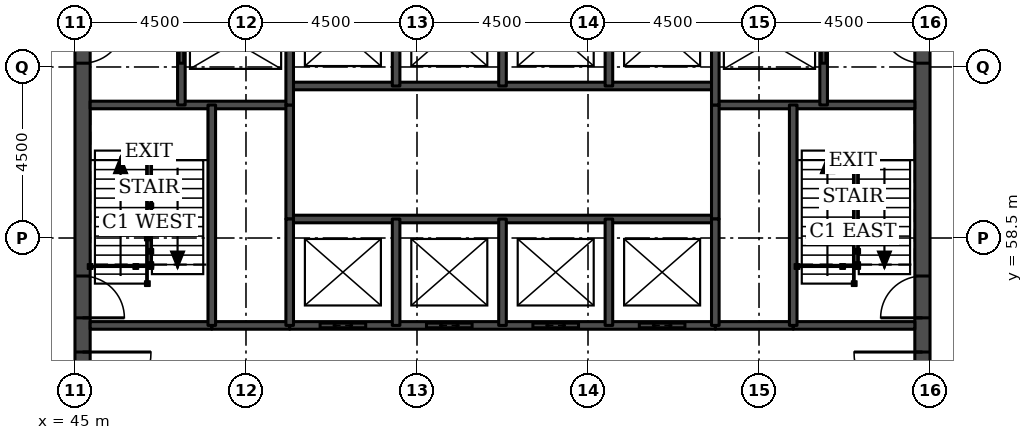
"""IFC4 building model, lengths in metres.
Left out: names, types, materials, properties, quantities, classifications, styles, units other than length and angle.
Written with IfcOpenShell. Run it as: python <this file> out.ifc"""

import sys

from ifc_helpers import new_model, si_unit, direction, frame, frame_2d, origin, place, context, subcontext, project, spatial, rectangle, extrude, element, fill, save


model = new_model("IFC4")
c1 = context("Model", 3, precision=1e-05, world=origin(), true_north=direction((0.0, 1.0)))
c2 = subcontext(c1, "Body", "Model", "MODEL_VIEW")
j1 = project(units=[si_unit("LENGTHUNIT", "METRE"), si_unit("PLANEANGLEUNIT", "RADIAN")], contexts=[c1])
p1 = place(None, origin())
s1 = spatial("IfcSite", under=j1, at=p1, CompositionType="ELEMENT")
p2 = place(p1, origin())
s2 = spatial("IfcBuilding", under=s1, at=p2, CompositionType="ELEMENT")
p3 = place(p2, frame((0.0, 0.0, 226.7)))
s3 = spatial("IfcBuildingStorey", under=s2, at=p3, CompositionType="ELEMENT", Elevation=226.7)
p4 = place(p3, frame((45.2, 49.5, 0.0), z_axis=(0.0, 0.0, 1.0), x_axis=(0.0, 1.0, 0.0)))
e1 = element("IfcWall", 1, at=p4, inside=s3, PredefinedType="SHEAR", context=c2, shape_type="SweptSolid", body=[
    extrude(rectangle(XDim=22.5, YDim=0.4, at=frame_2d((11.25, 0.0))), origin(), (0.0, 0.0, 1.0), 3.7),
])
p5 = place(p4, frame((4.2, 0.0, 0.0)))
e2 = element("IfcOpeningElement", 2, at=p5, cuts=e1, PredefinedType="OPENING", context=c2, shape_type="SweptSolid", body=[
    extrude(rectangle(XDim=1.8, YDim=2.1, at=frame_2d((0.9, 1.05))), frame((0.0, 0.21, 0.0), z_axis=(0.0, -1.0, 0.0), x_axis=(1.0, 0.0, 0.0)), (0.0, 0.0, 1.0), 0.42),
])
p6 = place(p4, frame((6.9, 0.0, 0.0)))
e3 = element("IfcOpeningElement", 3, at=p6, cuts=e1, PredefinedType="OPENING", context=c2, shape_type="SweptSolid", body=[
    extrude(rectangle(XDim=1.1, YDim=2.1, at=frame_2d((0.55, 1.05))), frame((0.0, 0.21, 0.0), z_axis=(0.0, -1.0, 0.0), x_axis=(1.0, 0.0, 0.0)), (0.0, 0.0, 1.0), 0.42),
])
p7 = place(p4, frame((13.6, 0.0, 0.0)))
e4 = element("IfcOpeningElement", 4, at=p7, cuts=e1, PredefinedType="OPENING", context=c2, shape_type="SweptSolid", body=[
    extrude(rectangle(XDim=1.1, YDim=2.1, at=frame_2d((0.55, 1.05))), frame((0.0, 0.21, 0.0), z_axis=(0.0, -1.0, 0.0), x_axis=(1.0, 0.0, 0.0)), (0.0, 0.0, 1.0), 0.42),
])
p8 = place(p4, frame((16.5, 0.0, 0.0)))
e5 = element("IfcOpeningElement", 5, at=p8, cuts=e1, PredefinedType="OPENING", context=c2, shape_type="SweptSolid", body=[
    extrude(rectangle(XDim=1.8, YDim=2.1, at=frame_2d((0.9, 1.05))), frame((0.0, 0.21, 0.0), z_axis=(0.0, -1.0, 0.0), x_axis=(1.0, 0.0, 0.0)), (0.0, 0.0, 1.0), 0.42),
])
p9 = place(p3, frame((67.3, 49.5, 0.0), z_axis=(0.0, 0.0, 1.0), x_axis=(0.0, 1.0, 0.0)))
e6 = element("IfcWall", 6, at=p9, inside=s3, PredefinedType="SHEAR", context=c2, shape_type="SweptSolid", body=[
    extrude(rectangle(XDim=22.5, YDim=0.4, at=frame_2d((11.25, 0.0))), origin(), (0.0, 0.0, 1.0), 3.7),
])
p10 = place(p9, frame((4.2, 0.0, 0.0)))
e7 = element("IfcOpeningElement", 7, at=p10, cuts=e6, PredefinedType="OPENING", context=c2, shape_type="SweptSolid", body=[
    extrude(rectangle(XDim=1.8, YDim=2.1, at=frame_2d((0.9, 1.05))), frame((0.0, 0.21, 0.0), z_axis=(0.0, -1.0, 0.0), x_axis=(1.0, 0.0, 0.0)), (0.0, 0.0, 1.0), 0.42),
])
p11 = place(p9, frame((6.9, 0.0, 0.0)))
e8 = element("IfcOpeningElement", 8, at=p11, cuts=e6, PredefinedType="OPENING", context=c2, shape_type="SweptSolid", body=[
    extrude(rectangle(XDim=1.1, YDim=2.1, at=frame_2d((0.55, 1.05))), frame((0.0, 0.21, 0.0), z_axis=(0.0, -1.0, 0.0), x_axis=(1.0, 0.0, 0.0)), (0.0, 0.0, 1.0), 0.42),
])
p12 = place(p9, frame((13.6, 0.0, 0.0)))
e9 = element("IfcOpeningElement", 9, at=p12, cuts=e6, PredefinedType="OPENING", context=c2, shape_type="SweptSolid", body=[
    extrude(rectangle(XDim=1.1, YDim=2.1, at=frame_2d((0.55, 1.05))), frame((0.0, 0.21, 0.0), z_axis=(0.0, -1.0, 0.0), x_axis=(1.0, 0.0, 0.0)), (0.0, 0.0, 1.0), 0.42),
])
p13 = place(p9, frame((16.5, 0.0, 0.0)))
e10 = element("IfcOpeningElement", 10, at=p13, cuts=e6, PredefinedType="OPENING", context=c2, shape_type="SweptSolid", body=[
    extrude(rectangle(XDim=1.8, YDim=2.1, at=frame_2d((0.9, 1.05))), frame((0.0, 0.21, 0.0), z_axis=(0.0, -1.0, 0.0), x_axis=(1.0, 0.0, 0.0)), (0.0, 0.0, 1.0), 0.42),
])
for number, where, z_axis, x_axis in (
    (11, (48.6, 56.2, 0.0), (0.0, 0.0, 1.0), (1.0, 0.0, 0.0)),
    (12, (61.85, 56.2, 0.0), (0.0, 0.0, 1.0), (1.0, 0.0, 0.0)),
):
    element("IfcWall", number, at=place(p3, frame(where, z_axis=z_axis, x_axis=x_axis)), inside=s3, PredefinedType="SOLIDWALL", context=c2, shape_type="SweptSolid", body=[
        extrude(rectangle(XDim=2.05, YDim=0.2, at=frame_2d((1.025, 0.0))), origin(), (0.0, 0.0, 1.0), 3.55),
    ])
p14 = place(p3, frame((45.4, 56.2, 0.0), z_axis=(0.0, 0.0, 1.0), x_axis=(1.0, 0.0, 0.0)))
e13 = element("IfcWall", 13, at=p14, inside=s3, PredefinedType="SOLIDWALL", context=c2, shape_type="SweptSolid", body=[
    extrude(rectangle(XDim=3.2, YDim=0.2, at=frame_2d((1.6, 0.0))), origin(), (0.0, 0.0, 1.0), 3.55),
])
p15 = place(p3, frame((50.65, 56.2, 0.0), z_axis=(0.0, 0.0, 1.0), x_axis=(1.0, 0.0, 0.0)))
e14 = element("IfcWall", 14, at=p15, inside=s3, PredefinedType="SOLIDWALL", context=c2, shape_type="SweptSolid", body=[
    extrude(rectangle(XDim=11.2, YDim=0.2, at=frame_2d((5.6, 0.0))), origin(), (0.0, 0.0, 1.0), 3.55),
])
p16 = place(p15, frame((0.8, 0.0, 0.0)))
e15 = element("IfcOpeningElement", 15, at=p16, cuts=e14, PredefinedType="OPENING", context=c2, shape_type="SweptSolid", body=[
    extrude(rectangle(XDim=1.2, YDim=2.1, at=frame_2d((0.6, 1.05))), frame((0.0, 0.11, 0.0), z_axis=(0.0, -1.0, 0.0), x_axis=(1.0, 0.0, 0.0)), (0.0, 0.0, 1.0), 0.22),
])
p17 = place(p15, frame((3.6, 0.0, 0.0)))
e16 = element("IfcOpeningElement", 16, at=p17, cuts=e14, PredefinedType="OPENING", context=c2, shape_type="SweptSolid", body=[
    extrude(rectangle(XDim=1.2, YDim=2.1, at=frame_2d((0.6, 1.05))), frame((0.0, 0.11, 0.0), z_axis=(0.0, -1.0, 0.0), x_axis=(1.0, 0.0, 0.0)), (0.0, 0.0, 1.0), 0.22),
])
p18 = place(p15, frame((6.4, 0.0, 0.0)))
e17 = element("IfcOpeningElement", 17, at=p18, cuts=e14, PredefinedType="OPENING", context=c2, shape_type="SweptSolid", body=[
    extrude(rectangle(XDim=1.2, YDim=2.1, at=frame_2d((0.6, 1.05))), frame((0.0, 0.11, 0.0), z_axis=(0.0, -1.0, 0.0), x_axis=(1.0, 0.0, 0.0)), (0.0, 0.0, 1.0), 0.22),
])
p19 = place(p15, frame((9.2, 0.0, 0.0)))
e18 = element("IfcOpeningElement", 18, at=p19, cuts=e14, PredefinedType="OPENING", context=c2, shape_type="SweptSolid", body=[
    extrude(rectangle(XDim=1.2, YDim=2.1, at=frame_2d((0.6, 1.05))), frame((0.0, 0.11, 0.0), z_axis=(0.0, -1.0, 0.0), x_axis=(1.0, 0.0, 0.0)), (0.0, 0.0, 1.0), 0.22),
])
p20 = place(p3, frame((63.9, 56.2, 0.0), z_axis=(0.0, 0.0, 1.0), x_axis=(1.0, 0.0, 0.0)))
e19 = element("IfcWall", 19, at=p20, inside=s3, PredefinedType="SOLIDWALL", context=c2, shape_type="SweptSolid", body=[
    extrude(rectangle(XDim=3.2, YDim=0.2, at=frame_2d((1.6, 0.0))), origin(), (0.0, 0.0, 1.0), 3.55),
])
p21 = place(p3, frame((50.65, 59.0, 0.0), z_axis=(0.0, 0.0, 1.0), x_axis=(1.0, 0.0, 0.0)))
e20 = element("IfcWall", 20, at=p21, inside=s3, PredefinedType="SOLIDWALL", context=c2, shape_type="SweptSolid", body=[
    extrude(rectangle(XDim=11.2, YDim=0.2, at=frame_2d((5.6, 0.0))), origin(), (0.0, 0.0, 1.0), 3.7),
])
for number, where, z_axis, x_axis in (
    (21, (45.4, 62.0, 0.0), (0.0, 0.0, 1.0), (1.0, 0.0, 0.0)),
    (22, (61.85, 62.0, 0.0), (0.0, 0.0, 1.0), (1.0, 0.0, 0.0)),
):
    element("IfcWall", number, at=place(p3, frame(where, z_axis=z_axis, x_axis=x_axis)), inside=s3, PredefinedType="SOLIDWALL", context=c2, shape_type="SweptSolid", body=[
        extrude(rectangle(XDim=5.25, YDim=0.2, at=frame_2d((2.625, 0.0))), origin(), (0.0, 0.0, 1.0), 3.55),
    ])
p22 = place(p3, frame((50.65, 62.5, 0.0), z_axis=(0.0, 0.0, 1.0), x_axis=(1.0, 0.0, 0.0)))
e23 = element("IfcWall", 23, at=p22, inside=s3, PredefinedType="SOLIDWALL", context=c2, shape_type="SweptSolid", body=[
    extrude(rectangle(XDim=11.2, YDim=0.2, at=frame_2d((5.6, 0.0))), origin(), (0.0, 0.0, 1.0), 3.7),
])
p23 = place(p3, frame((47.8, 62.0, 0.0), z_axis=(0.0, 0.0, 1.0), x_axis=(0.0, 1.0, 0.0)))
e24 = element("IfcWall", 24, at=p23, inside=s3, PredefinedType="SOLIDWALL", context=c2, shape_type="SweptSolid", body=[
    extrude(rectangle(XDim=3.3, YDim=0.2, at=frame_2d((1.65, 0.0))), origin(), (0.0, 0.0, 1.0), 3.55),
])
p24 = place(p23, frame((1.1, 0.0, 0.0)))
e25 = element("IfcOpeningElement", 25, at=p24, cuts=e24, PredefinedType="OPENING", context=c2, shape_type="SweptSolid", body=[
    extrude(rectangle(XDim=1.1, YDim=2.1, at=frame_2d((0.55, 1.05))), frame((0.0, 0.11, 0.0), z_axis=(0.0, -1.0, 0.0), x_axis=(1.0, 0.0, 0.0)), (0.0, 0.0, 1.0), 0.22),
])
p25 = place(p3, frame((48.6, 56.2, 0.0), z_axis=(0.0, 0.0, 1.0), x_axis=(0.0, 1.0, 0.0)))
e26 = element("IfcWall", 26, at=p25, inside=s3, PredefinedType="SOLIDWALL", context=c2, shape_type="SweptSolid", body=[
    extrude(rectangle(XDim=5.8, YDim=0.2, at=frame_2d((2.9, 0.0))), origin(), (0.0, 0.0, 1.0), 3.55),
])
p26 = place(p3, frame((50.65, 59.0, 0.0), z_axis=(0.0, 0.0, 1.0), x_axis=(0.0, 1.0, 0.0)))
e27 = element("IfcWall", 27, at=p26, inside=s3, PredefinedType="SOLIDWALL", context=c2, shape_type="SweptSolid", body=[
    extrude(rectangle(XDim=3.0, YDim=0.2, at=frame_2d((1.5, 0.0))), origin(), (0.0, 0.0, 1.0), 3.7),
])
p27 = place(p3, frame((50.65, 56.2, 0.0), z_axis=(0.0, 0.0, 1.0), x_axis=(0.0, 1.0, 0.0)))
e28 = element("IfcWall", 28, at=p27, inside=s3, PredefinedType="SOLIDWALL", context=c2, shape_type="SweptSolid", body=[
    extrude(rectangle(XDim=2.8, YDim=0.2, at=frame_2d((1.4, 0.0))), origin(), (0.0, 0.0, 1.0), 3.55),
])
p28 = place(p3, frame((50.65, 62.0, 0.0), z_axis=(0.0, 0.0, 1.0), x_axis=(0.0, 1.0, 0.0)))
e29 = element("IfcWall", 29, at=p28, inside=s3, PredefinedType="SOLIDWALL", context=c2, shape_type="SweptSolid", body=[
    extrude(rectangle(XDim=3.3, YDim=0.2, at=frame_2d((1.65, 0.0))), origin(), (0.0, 0.0, 1.0), 3.55),
])
for number, where, z_axis, x_axis in (
    (30, (53.45, 56.2, 0.0), (0.0, 0.0, 1.0), (0.0, 1.0, 0.0)),
    (31, (53.45, 62.5, 0.0), (0.0, 0.0, 1.0), (0.0, 1.0, 0.0)),
    (32, (56.25, 56.2, 0.0), (0.0, 0.0, 1.0), (0.0, 1.0, 0.0)),
    (33, (56.25, 62.5, 0.0), (0.0, 0.0, 1.0), (0.0, 1.0, 0.0)),
    (34, (59.05, 56.2, 0.0), (0.0, 0.0, 1.0), (0.0, 1.0, 0.0)),
    (35, (59.05, 62.5, 0.0), (0.0, 0.0, 1.0), (0.0, 1.0, 0.0)),
):
    element("IfcWall", number, at=place(p3, frame(where, z_axis=z_axis, x_axis=x_axis)), inside=s3, PredefinedType="SOLIDWALL", context=c2, shape_type="SweptSolid", body=[
        extrude(rectangle(XDim=2.8, YDim=0.2, at=frame_2d((1.4, 0.0))), origin(), (0.0, 0.0, 1.0), 3.55),
    ])
p29 = place(p3, frame((61.85, 59.0, 0.0), z_axis=(0.0, 0.0, 1.0), x_axis=(0.0, 1.0, 0.0)))
e36 = element("IfcWall", 36, at=p29, inside=s3, PredefinedType="SOLIDWALL", context=c2, shape_type="SweptSolid", body=[
    extrude(rectangle(XDim=3.0, YDim=0.2, at=frame_2d((1.5, 0.0))), origin(), (0.0, 0.0, 1.0), 3.7),
])
p30 = place(p3, frame((61.85, 56.2, 0.0), z_axis=(0.0, 0.0, 1.0), x_axis=(0.0, 1.0, 0.0)))
e37 = element("IfcWall", 37, at=p30, inside=s3, PredefinedType="SOLIDWALL", context=c2, shape_type="SweptSolid", body=[
    extrude(rectangle(XDim=2.8, YDim=0.2, at=frame_2d((1.4, 0.0))), origin(), (0.0, 0.0, 1.0), 3.55),
])
p31 = place(p3, frame((61.85, 62.0, 0.0), z_axis=(0.0, 0.0, 1.0), x_axis=(0.0, 1.0, 0.0)))
e38 = element("IfcWall", 38, at=p31, inside=s3, PredefinedType="SOLIDWALL", context=c2, shape_type="SweptSolid", body=[
    extrude(rectangle(XDim=3.3, YDim=0.2, at=frame_2d((1.65, 0.0))), origin(), (0.0, 0.0, 1.0), 3.55),
])
p32 = place(p3, frame((63.9, 56.2, 0.0), z_axis=(0.0, 0.0, 1.0), x_axis=(0.0, 1.0, 0.0)))
e39 = element("IfcWall", 39, at=p32, inside=s3, PredefinedType="SOLIDWALL", context=c2, shape_type="SweptSolid", body=[
    extrude(rectangle(XDim=5.8, YDim=0.2, at=frame_2d((2.9, 0.0))), origin(), (0.0, 0.0, 1.0), 3.55),
])
p33 = place(p3, frame((64.7, 62.0, 0.0), z_axis=(0.0, 0.0, 1.0), x_axis=(0.0, 1.0, 0.0)))
e40 = element("IfcWall", 40, at=p33, inside=s3, PredefinedType="SOLIDWALL", context=c2, shape_type="SweptSolid", body=[
    extrude(rectangle(XDim=3.3, YDim=0.2, at=frame_2d((1.65, 0.0))), origin(), (0.0, 0.0, 1.0), 3.55),
])
p34 = place(p33, frame((1.1, 0.0, 0.0)))
e41 = element("IfcOpeningElement", 41, at=p34, cuts=e40, PredefinedType="OPENING", context=c2, shape_type="SweptSolid", body=[
    extrude(rectangle(XDim=1.1, YDim=2.1, at=frame_2d((0.55, 1.05))), frame((0.0, 0.11, 0.0), z_axis=(0.0, -1.0, 0.0), x_axis=(1.0, 0.0, 0.0)), (0.0, 0.0, 1.0), 0.22),
])
p35 = place(p16, origin())
e42 = element("IfcDoor", 42, at=p35, inside=s3, OperationType="DOUBLE_DOOR_SLIDING", PredefinedType="DOOR", context=c2, shape_type="SweptSolid", body=[
    extrude(rectangle(XDim=1.2, YDim=2.1, at=frame_2d((0.6, 1.05))), frame((0.0, 0.025, 0.0), z_axis=(0.0, -1.0, 0.0), x_axis=(1.0, 0.0, 0.0)), (0.0, 0.0, 1.0), 0.05),
])
fill(e15, e42)
p36 = place(p17, origin())
e43 = element("IfcDoor", 43, at=p36, inside=s3, OperationType="DOUBLE_DOOR_SLIDING", PredefinedType="DOOR", context=c2, shape_type="SweptSolid", body=[
    extrude(rectangle(XDim=1.2, YDim=2.1, at=frame_2d((0.6, 1.05))), frame((0.0, 0.025, 0.0), z_axis=(0.0, -1.0, 0.0), x_axis=(1.0, 0.0, 0.0)), (0.0, 0.0, 1.0), 0.05),
])
fill(e16, e43)
p37 = place(p18, origin())
e44 = element("IfcDoor", 44, at=p37, inside=s3, OperationType="DOUBLE_DOOR_SLIDING", PredefinedType="DOOR", context=c2, shape_type="SweptSolid", body=[
    extrude(rectangle(XDim=1.2, YDim=2.1, at=frame_2d((0.6, 1.05))), frame((0.0, 0.025, 0.0), z_axis=(0.0, -1.0, 0.0), x_axis=(1.0, 0.0, 0.0)), (0.0, 0.0, 1.0), 0.05),
])
fill(e17, e44)
p38 = place(p19, origin())
e45 = element("IfcDoor", 45, at=p38, inside=s3, OperationType="DOUBLE_DOOR_SLIDING", PredefinedType="DOOR", context=c2, shape_type="SweptSolid", body=[
    extrude(rectangle(XDim=1.2, YDim=2.1, at=frame_2d((0.6, 1.05))), frame((0.0, 0.025, 0.0), z_axis=(0.0, -1.0, 0.0), x_axis=(1.0, 0.0, 0.0)), (0.0, 0.0, 1.0), 0.05),
])
fill(e18, e45)
p39 = place(p24, origin())
e46 = element("IfcDoor", 46, at=p39, inside=s3, OperationType="DOUBLE_DOOR_SLIDING", PredefinedType="DOOR", context=c2, shape_type="SweptSolid", body=[
    extrude(rectangle(XDim=1.1, YDim=2.1, at=frame_2d((0.55, 1.05))), frame((0.0, 0.025, 0.0), z_axis=(0.0, -1.0, 0.0), x_axis=(1.0, 0.0, 0.0)), (0.0, 0.0, 1.0), 0.05),
])
fill(e25, e46)
p40 = place(p34, origin())
e47 = element("IfcDoor", 47, at=p40, inside=s3, OperationType="DOUBLE_DOOR_SLIDING", PredefinedType="DOOR", context=c2, shape_type="SweptSolid", body=[
    extrude(rectangle(XDim=1.1, YDim=2.1, at=frame_2d((0.55, 1.05))), frame((0.0, 0.025, 0.0), z_axis=(0.0, -1.0, 0.0), x_axis=(1.0, 0.0, 0.0)), (0.0, 0.0, 1.0), 0.05),
])
fill(e41, e47)
p41 = place(p5, frame((1.8, 0.0, 0.0), z_axis=(0.0, 0.0, 1.0), x_axis=(-1.0, 0.0, 0.0)))
e48 = element("IfcDoor", 48, at=p41, inside=s3, OperationType="SINGLE_SWING_LEFT", PredefinedType="DOOR", context=c2, shape_type="SweptSolid", body=[
    extrude(rectangle(XDim=1.8, YDim=2.1, at=frame_2d((0.9, 1.05))), frame((0.0, 0.025, 0.0), z_axis=(0.0, -1.0, 0.0), x_axis=(1.0, 0.0, 0.0)), (0.0, 0.0, 1.0), 0.05),
])
fill(e2, e48)
p42 = place(p6, frame((1.1, 0.0, 0.0), z_axis=(0.0, 0.0, 1.0), x_axis=(-1.0, 0.0, 0.0)))
e49 = element("IfcDoor", 49, at=p42, inside=s3, OperationType="SINGLE_SWING_RIGHT", PredefinedType="DOOR", context=c2, shape_type="SweptSolid", body=[
    extrude(rectangle(XDim=1.1, YDim=2.1, at=frame_2d((0.55, 1.05))), frame((0.0, 0.025, 0.0), z_axis=(0.0, -1.0, 0.0), x_axis=(1.0, 0.0, 0.0)), (0.0, 0.0, 1.0), 0.05),
])
fill(e3, e49)
p43 = place(p7, frame((1.1, 0.0, 0.0), z_axis=(0.0, 0.0, 1.0), x_axis=(-1.0, 0.0, 0.0)))
e50 = element("IfcDoor", 50, at=p43, inside=s3, OperationType="SINGLE_SWING_LEFT", PredefinedType="DOOR", context=c2, shape_type="SweptSolid", body=[
    extrude(rectangle(XDim=1.1, YDim=2.1, at=frame_2d((0.55, 1.05))), frame((0.0, 0.025, 0.0), z_axis=(0.0, -1.0, 0.0), x_axis=(1.0, 0.0, 0.0)), (0.0, 0.0, 1.0), 0.05),
])
fill(e4, e50)
p44 = place(p10, origin())
e51 = element("IfcDoor", 51, at=p44, inside=s3, OperationType="SINGLE_SWING_RIGHT", PredefinedType="DOOR", context=c2, shape_type="SweptSolid", body=[
    extrude(rectangle(XDim=1.8, YDim=2.1, at=frame_2d((0.9, 1.05))), frame((0.0, 0.025, 0.0), z_axis=(0.0, -1.0, 0.0), x_axis=(1.0, 0.0, 0.0)), (0.0, 0.0, 1.0), 0.05),
])
fill(e7, e51)
p45 = place(p11, origin())
e52 = element("IfcDoor", 52, at=p45, inside=s3, OperationType="SINGLE_SWING_LEFT", PredefinedType="DOOR", context=c2, shape_type="SweptSolid", body=[
    extrude(rectangle(XDim=1.1, YDim=2.1, at=frame_2d((0.55, 1.05))), frame((0.0, 0.025, 0.0), z_axis=(0.0, -1.0, 0.0), x_axis=(1.0, 0.0, 0.0)), (0.0, 0.0, 1.0), 0.05),
])
fill(e8, e52)
p46 = place(p12, origin())
e53 = element("IfcDoor", 53, at=p46, inside=s3, OperationType="SINGLE_SWING_RIGHT", PredefinedType="DOOR", context=c2, shape_type="SweptSolid", body=[
    extrude(rectangle(XDim=1.1, YDim=2.1, at=frame_2d((0.55, 1.05))), frame((0.0, 0.025, 0.0), z_axis=(0.0, -1.0, 0.0), x_axis=(1.0, 0.0, 0.0)), (0.0, 0.0, 1.0), 0.05),
])
fill(e9, e53)
save(model, sys.argv[1])
